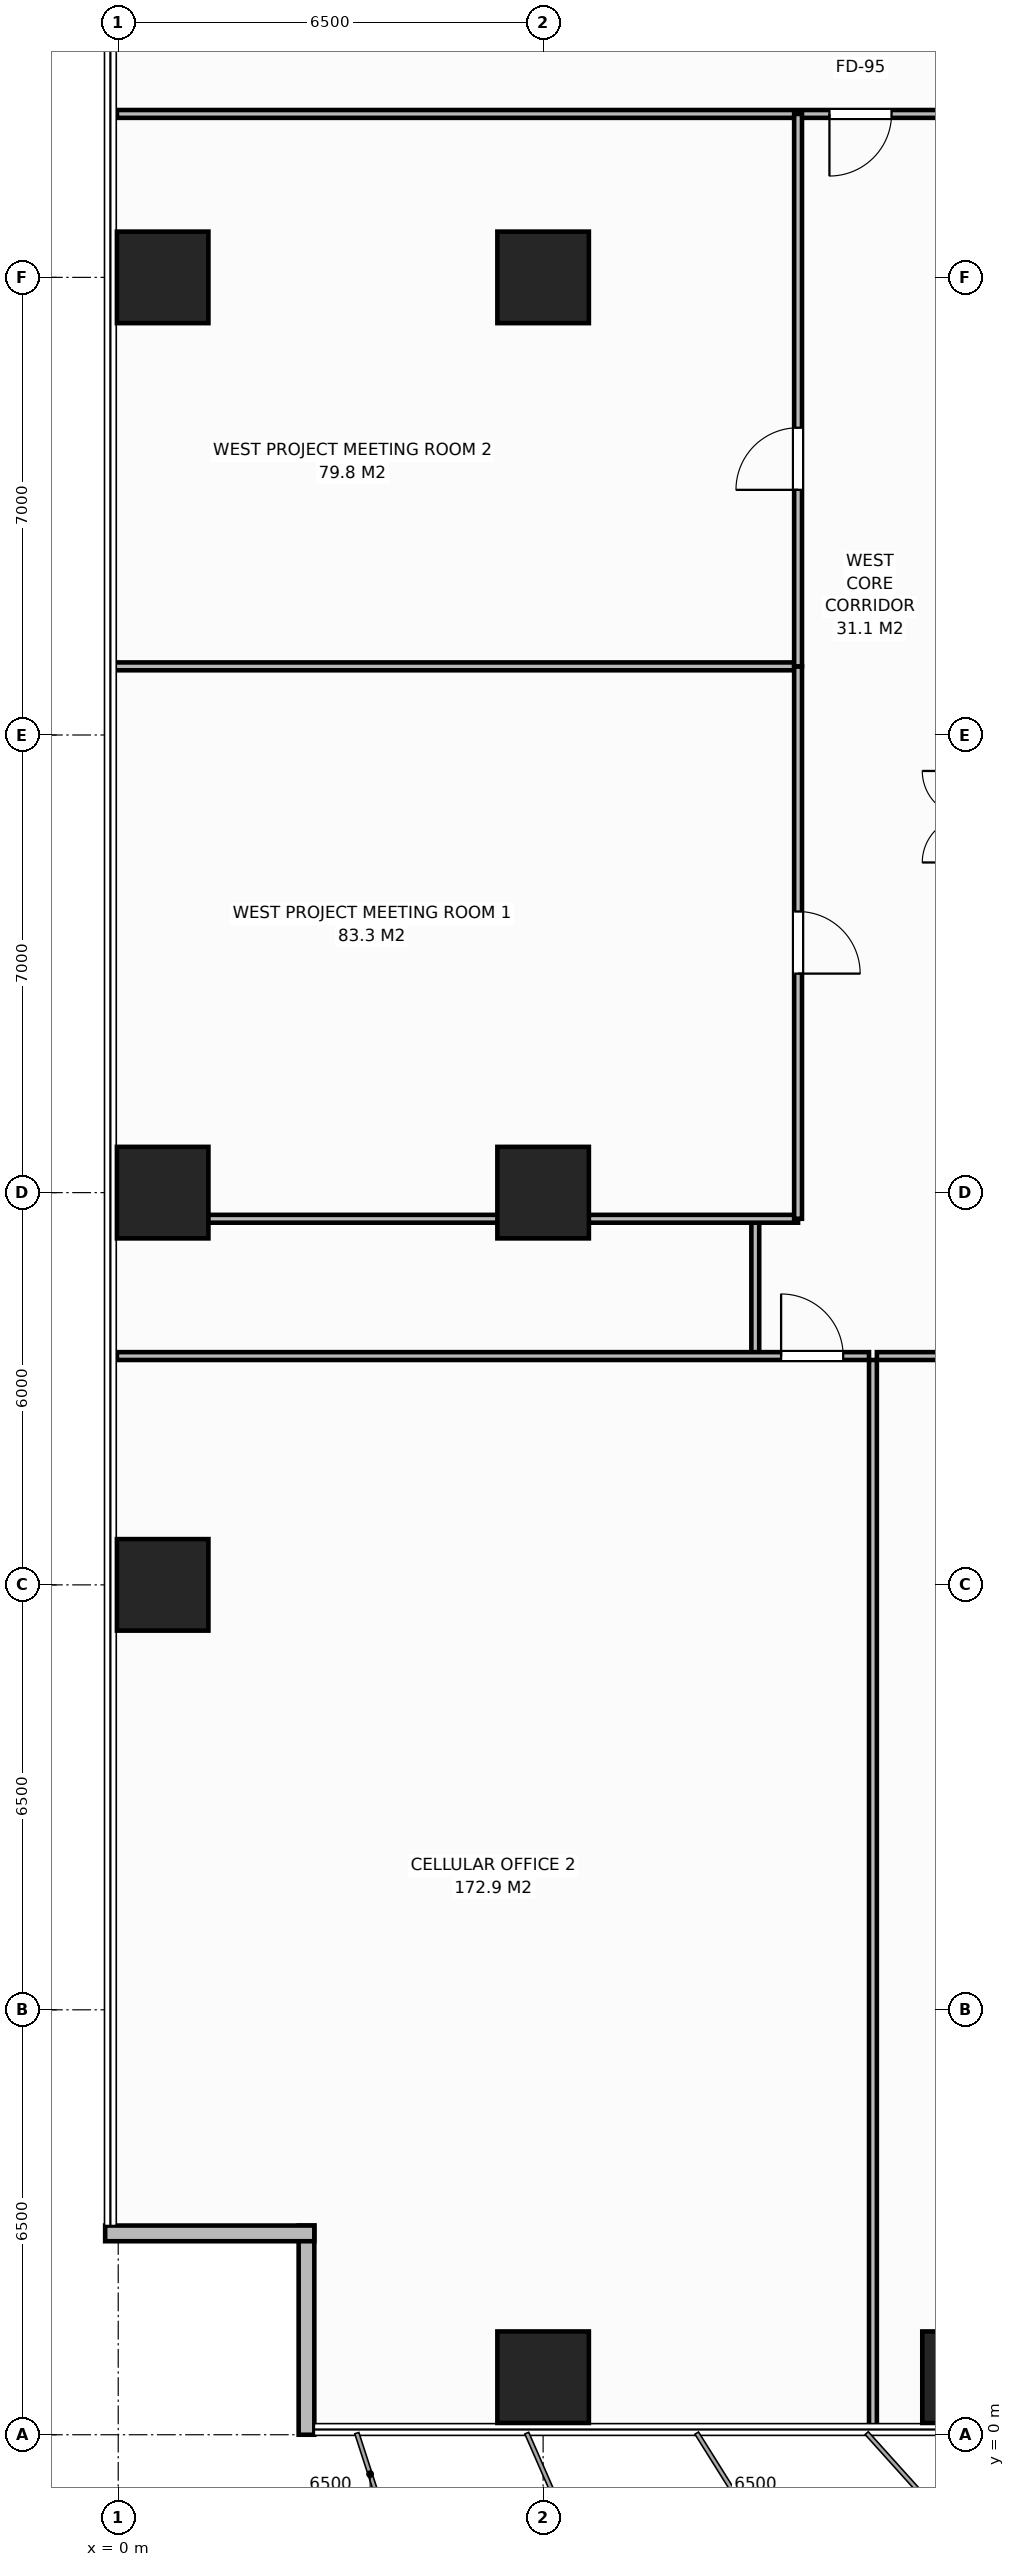
"""IFC4 building model, lengths in metres.
Left out: names, types, materials, properties, quantities, classifications, styles, units other than length and angle.
Written with IfcOpenShell. Run it as: python <this file> out.ifc"""

import sys

from ifc_helpers import new_model, si_unit, direction, frame, frame_2d, origin, origin_2d, place, context, subcontext, project, spatial, rectangle, extrude, element, fill, save


model = new_model("IFC4")
c1 = context("Model", 3, precision=1e-05, world=origin(), true_north=direction((0.0, 1.0)))
c2 = subcontext(c1, "Body", "Model", "MODEL_VIEW")
j1 = project(units=[si_unit("LENGTHUNIT", "METRE"), si_unit("PLANEANGLEUNIT", "RADIAN")], contexts=[c1])
p1 = place(None, origin())
s1 = spatial("IfcSite", under=j1, at=p1, CompositionType="ELEMENT")
p2 = place(p1, origin())
s2 = spatial("IfcBuilding", under=s1, at=p2, CompositionType="ELEMENT")
p3 = place(p2, frame((0.0, 0.0, 77.2)))
s3 = spatial("IfcBuildingStorey", under=s2, at=p3, CompositionType="ELEMENT", Elevation=77.2)
for number, where, z_axis, x_axis in (
    (1, (6.5, 19.0, 0.0), (0.0, 0.0, 1.0), (1.0, 0.0, 0.0)),
    (2, (6.5, 33.0, 0.0), (0.0, 0.0, 1.0), (1.0, 0.0, 0.0)),
    (3, (6.5, 0.88, 0.0), (0.0, 0.0, 1.0), (1.0, 0.0, 0.0)),
    (4, (13.0, 0.88, 0.0), (0.0, 0.0, 1.0), (1.0, 0.0, 0.0)),
    (5, (0.68, 13.0, 0.0), (0.0, 0.0, 1.0), (1.0, 0.0, 0.0)),
    (6, (0.68, 19.0, 0.0), (0.0, 0.0, 1.0), (1.0, 0.0, 0.0)),
    (7, (0.68, 33.0, 0.0), (0.0, 0.0, 1.0), (1.0, 0.0, 0.0)),
):
    element("IfcColumn", number, at=place(p3, frame(where, z_axis=z_axis, x_axis=x_axis)), inside=s3, PredefinedType="COLUMN", context=c2, shape_type="SweptSolid", body=[
        extrude(rectangle(XDim=1.4, YDim=1.4, at=origin_2d()), origin(), (0.0, 0.0, 1.0), 3.8),
    ])
for number, where, z_axis, x_axis in (
    (8, (2.88, 0.0, 0.0), (0.0, 0.0, 1.0), (0.0, 1.0, 0.0)),
    (9, (3.0, 3.08, 0.0), (0.0, 0.0, 1.0), (-1.0, 0.0, 0.0)),
):
    element("IfcWall", number, at=place(p3, frame(where, z_axis=z_axis, x_axis=x_axis)), inside=s3, PredefinedType="STANDARD", context=c2, shape_type="SweptSolid", body=[
        extrude(rectangle(XDim=3.2, YDim=0.24, at=frame_2d((1.6, 0.0))), origin(), (0.0, 0.0, 1.0), 3.52),
    ])
p4 = place(p3, frame((9.746, 16.5, 0.0), z_axis=(0.0, 0.0, 1.0), x_axis=(0.0, 1.0, 0.0)))
e10 = element("IfcWall", 10, at=p4, inside=s3, PredefinedType="PARTITIONING", context=c2, shape_type="SweptSolid", body=[
    extrude(rectangle(XDim=2.1, YDim=0.12, at=frame_2d((1.05, 0.0))), origin(), (0.0, 0.0, 1.0), 3.52),
])
p5 = place(p3, frame((-0.02, 35.5, 0.0), z_axis=(0.0, 0.0, 1.0), x_axis=(1.0, 0.0, 0.0)))
e11 = element("IfcWall", 11, at=p5, inside=s3, PredefinedType="PARTITIONING", context=c2, shape_type="SweptSolid", body=[
    extrude(rectangle(XDim=13.16, YDim=0.12, at=frame_2d((6.58, 0.0))), origin(), (0.0, 0.0, 1.0), 3.52),
])
p6 = place(p5, frame((10.9, 0.0, 0.0)))
e12 = element("IfcOpeningElement", 12, at=p6, cuts=e11, PredefinedType="OPENING", context=c2, shape_type="SweptSolid", body=[
    extrude(rectangle(XDim=0.95, YDim=2.15, at=frame_2d((0.475, 1.075))), frame((0.0, 0.07, 0.0), z_axis=(0.0, -1.0, 0.0), x_axis=(1.0, 0.0, 0.0)), (0.0, 0.0, 1.0), 0.14),
])
p7 = place(p3, frame((11.545, 0.02, 0.0), z_axis=(0.0, 0.0, 1.0), x_axis=(0.0, 1.0, 0.0)))
e13 = element("IfcWall", 13, at=p7, inside=s3, PredefinedType="PARTITIONING", context=c2, shape_type="SweptSolid", body=[
    extrude(rectangle(XDim=16.42, YDim=0.12, at=frame_2d((8.21, 0.0))), origin(), (0.0, 0.0, 1.0), 3.52),
])
p8 = place(p3, frame((-0.02, 16.5, 0.0), z_axis=(0.0, 0.0, 1.0), x_axis=(1.0, 0.0, 0.0)))
e14 = element("IfcWall", 14, at=p8, inside=s3, PredefinedType="PARTITIONING", context=c2, shape_type="SweptSolid", body=[
    extrude(rectangle(XDim=11.506, YDim=0.12, at=frame_2d((5.753, 0.0))), origin(), (0.0, 0.0, 1.0), 3.52),
])
p9 = place(p8, frame((10.16, 0.0, 0.0)))
e15 = element("IfcOpeningElement", 15, at=p9, cuts=e14, PredefinedType="OPENING", context=c2, shape_type="SweptSolid", body=[
    extrude(rectangle(XDim=0.95, YDim=2.15, at=frame_2d((0.475, 1.075))), frame((0.0, 0.07, 0.0), z_axis=(0.0, -1.0, 0.0), x_axis=(1.0, 0.0, 0.0)), (0.0, 0.0, 1.0), 0.14),
])
p10 = place(p3, frame((11.605, 16.5, 0.0), z_axis=(0.0, 0.0, 1.0), x_axis=(1.0, 0.0, 0.0)))
e16 = element("IfcWall", 16, at=p10, inside=s3, PredefinedType="PARTITIONING", context=c2, shape_type="SweptSolid", body=[
    extrude(rectangle(XDim=13.67, YDim=0.12, at=frame_2d((6.835, 0.0))), origin(), (0.0, 0.0, 1.0), 3.52),
])
p11 = place(p10, frame((12.24, 0.0, 0.0)))
e17 = element("IfcOpeningElement", 17, at=p11, cuts=e16, PredefinedType="OPENING", context=c2, shape_type="SweptSolid", body=[
    extrude(rectangle(XDim=0.95, YDim=2.15, at=frame_2d((0.475, 1.075))), frame((0.0, 0.07, 0.0), z_axis=(0.0, -1.0, 0.0), x_axis=(1.0, 0.0, 0.0)), (0.0, 0.0, 1.0), 0.14),
])
for number, where, z_axis, x_axis in (
    (18, (-0.18, 18.6, 0.0), (0.0, 0.0, 1.0), (1.0, 0.0, 0.0)),
    (19, (-0.18, 27.05, 0.0), (0.0, 0.0, 1.0), (1.0, 0.0, 0.0)),
):
    element("IfcWall", number, at=place(p3, frame(where, z_axis=z_axis, x_axis=x_axis)), inside=s3, PredefinedType="PARTITIONING", context=c2, shape_type="SweptSolid", body=[
        extrude(rectangle(XDim=10.58, YDim=0.12, at=frame_2d((5.29, 0.0))), origin(), (0.0, 0.0, 1.0), 3.52),
    ])
p12 = place(p3, frame((10.4, 18.6, 0.0), z_axis=(0.0, 0.0, 1.0), x_axis=(0.0, 1.0, 0.0)))
e20 = element("IfcWall", 20, at=p12, inside=s3, PredefinedType="PARTITIONING", context=c2, shape_type="SweptSolid", body=[
    extrude(rectangle(XDim=8.45, YDim=0.12, at=frame_2d((4.225, 0.0))), origin(), (0.0, 0.0, 1.0), 3.52),
])
p13 = place(p12, frame((3.75, 0.0, 0.0)))
e21 = element("IfcOpeningElement", 21, at=p13, cuts=e20, PredefinedType="OPENING", context=c2, shape_type="SweptSolid", body=[
    extrude(rectangle(XDim=0.95, YDim=2.15, at=frame_2d((0.475, 1.075))), frame((0.0, 0.07, 0.0), z_axis=(0.0, -1.0, 0.0), x_axis=(1.0, 0.0, 0.0)), (0.0, 0.0, 1.0), 0.14),
])
p14 = place(p3, frame((10.4, 27.05, 0.0), z_axis=(0.0, 0.0, 1.0), x_axis=(0.0, 1.0, 0.0)))
e22 = element("IfcWall", 22, at=p14, inside=s3, PredefinedType="PARTITIONING", context=c2, shape_type="SweptSolid", body=[
    extrude(rectangle(XDim=8.45, YDim=0.12, at=frame_2d((4.225, 0.0))), origin(), (0.0, 0.0, 1.0), 3.52),
])
p15 = place(p14, frame((2.7, 0.0, 0.0)))
e23 = element("IfcOpeningElement", 23, at=p15, cuts=e22, PredefinedType="OPENING", context=c2, shape_type="SweptSolid", body=[
    extrude(rectangle(XDim=0.95, YDim=2.15, at=frame_2d((0.475, 1.075))), frame((0.0, 0.07, 0.0), z_axis=(0.0, -1.0, 0.0), x_axis=(1.0, 0.0, 0.0)), (0.0, 0.0, 1.0), 0.14),
])
p16 = place(p6, origin())
e24 = element("IfcDoor", 24, at=p16, inside=s3, OperationType="SINGLE_SWING_RIGHT", PredefinedType="DOOR", context=c2, shape_type="SweptSolid", body=[
    extrude(rectangle(XDim=0.95, YDim=2.15, at=frame_2d((0.475, 1.075))), frame((0.0, 0.025, 0.0), z_axis=(0.0, -1.0, 0.0), x_axis=(1.0, 0.0, 0.0)), (0.0, 0.0, 1.0), 0.05),
])
fill(e12, e24)
p17 = place(p9, origin())
e25 = element("IfcDoor", 25, at=p17, inside=s3, OperationType="SINGLE_SWING_LEFT", PredefinedType="DOOR", context=c2, shape_type="SweptSolid", body=[
    extrude(rectangle(XDim=0.95, YDim=2.15, at=frame_2d((0.475, 1.075))), frame((0.0, 0.025, 0.0), z_axis=(0.0, -1.0, 0.0), x_axis=(1.0, 0.0, 0.0)), (0.0, 0.0, 1.0), 0.05),
])
fill(e15, e25)
p18 = place(p13, origin())
e26 = element("IfcDoor", 26, at=p18, inside=s3, OperationType="SINGLE_SWING_RIGHT", PredefinedType="DOOR", context=c2, shape_type="SweptSolid", body=[
    extrude(rectangle(XDim=0.95, YDim=2.15, at=frame_2d((0.475, 1.075))), frame((0.0, 0.025, 0.0), z_axis=(0.0, -1.0, 0.0), x_axis=(1.0, 0.0, 0.0)), (0.0, 0.0, 1.0), 0.05),
])
fill(e21, e26)
p19 = place(p15, origin())
e27 = element("IfcDoor", 27, at=p19, inside=s3, OperationType="SINGLE_SWING_LEFT", PredefinedType="DOOR", context=c2, shape_type="SweptSolid", body=[
    extrude(rectangle(XDim=0.95, YDim=2.15, at=frame_2d((0.475, 1.075))), frame((0.0, 0.025, 0.0), z_axis=(0.0, -1.0, 0.0), x_axis=(1.0, 0.0, 0.0)), (0.0, 0.0, 1.0), 0.05),
])
fill(e23, e27)
save(model, sys.argv[1])
